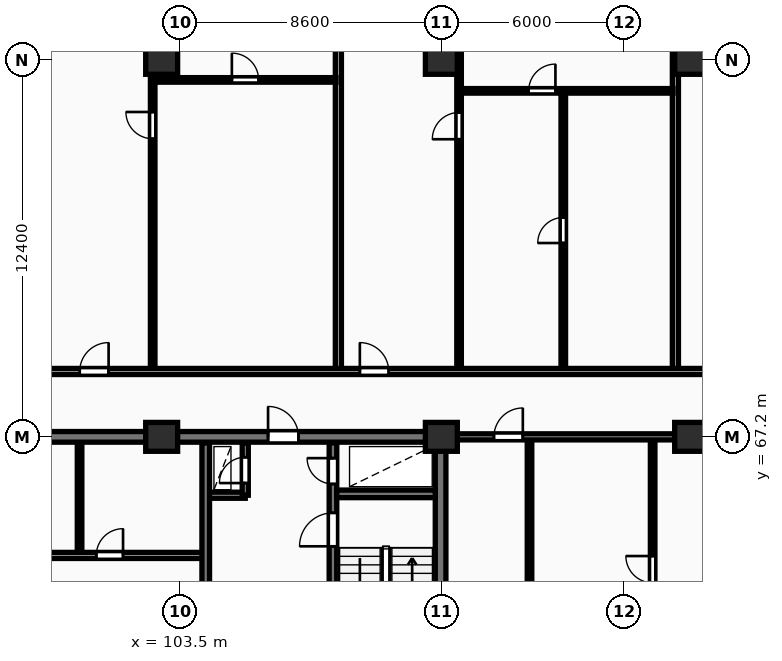
"""IFC4 building model, lengths in metres.
Left out: names, types, materials, properties, quantities, classifications, styles, units other than length and angle.
Written with IfcOpenShell. Run it as: python <this file> out.ifc"""

import sys

from ifc_helpers import new_model, si_unit, direction, frame, frame_2d, origin, origin_2d, place, context, subcontext, project, spatial, rectangle, extrude, element, fill, save


model = new_model("IFC4")
c1 = context("Model", 3, precision=1e-05, world=origin(), true_north=direction((0.0, 1.0)))
c2 = subcontext(c1, "Body", "Model", "MODEL_VIEW")
j1 = project(units=[si_unit("LENGTHUNIT", "METRE"), si_unit("PLANEANGLEUNIT", "RADIAN")], contexts=[c1])
p1 = place(None, origin())
s1 = spatial("IfcSite", under=j1, at=p1, CompositionType="ELEMENT")
p2 = place(p1, origin())
s2 = spatial("IfcBuilding", under=s1, at=p2, CompositionType="ELEMENT")
p3 = place(p2, frame((0.0, 0.0, 24.0)))
s3 = spatial("IfcBuildingStorey", under=s2, at=p3, CompositionType="ELEMENT", Elevation=24.0)
for number, where, z_axis, x_axis in (
    (1, (102.9, 67.2, 0.0), (0.0, 0.0, 1.0), (1.0, 0.0, 0.0)),
    (2, (102.9, 79.6, 0.0), (0.0, 0.0, 1.0), (1.0, 0.0, 0.0)),
    (3, (112.1, 67.2, 0.0), (0.0, 0.0, 1.0), (1.0, 0.0, 0.0)),
    (4, (112.1, 79.6, 0.0), (0.0, 0.0, 1.0), (1.0, 0.0, 0.0)),
    (5, (120.3, 67.2, 0.0), (0.0, 0.0, 1.0), (1.0, 0.0, 0.0)),
    (6, (120.3, 79.6, 0.0), (0.0, 0.0, 1.0), (1.0, 0.0, 0.0)),
):
    element("IfcColumn", number, at=place(p3, frame(where, z_axis=z_axis, x_axis=x_axis)), inside=s3, PredefinedType="COLUMN", context=c2, shape_type="SweptSolid", body=[
        extrude(rectangle(XDim=1.05, YDim=0.95, at=origin_2d()), origin(), (0.0, 0.0, 1.0), 3.25),
    ])
p4 = place(p3, frame((112.075, 55.375, 0.0), z_axis=(0.0, 0.0, 1.0), x_axis=(0.0, 1.0, 0.0)))
e7 = element("IfcWall", 7, at=p4, inside=s3, PredefinedType="SHEAR", context=c2, shape_type="SweptSolid", body=[
    extrude(rectangle(XDim=11.65, YDim=0.35, at=frame_2d((5.825, 0.0))), origin(), (0.0, 0.0, 1.0), 3.25),
])
p5 = place(p3, frame((75.95, 67.2, 0.0), z_axis=(0.0, 0.0, 1.0), x_axis=(1.0, 0.0, 0.0)))
e8 = element("IfcWall", 8, at=p5, inside=s3, PredefinedType="SHEAR", context=c2, shape_type="SweptSolid", body=[
    extrude(rectangle(XDim=36.3, YDim=0.35, at=frame_2d((18.15, 0.0))), origin(), (0.0, 0.0, 1.0), 3.25),
])
p6 = place(p5, frame((5.25, 0.0, 0.0)))
e9 = element("IfcOpeningElement", 9, at=p6, cuts=e8, PredefinedType="OPENING", context=c2, shape_type="SweptSolid", body=[
    extrude(rectangle(XDim=1.0, YDim=2.15, at=frame_2d((0.5, 1.075))), frame((0.0, 0.185, 0.0), z_axis=(0.0, -1.0, 0.0), x_axis=(1.0, 0.0, 0.0)), (0.0, 0.0, 1.0), 0.37),
])
p7 = place(p5, frame((21.6, 0.0, 0.0)))
e10 = element("IfcOpeningElement", 10, at=p7, cuts=e8, PredefinedType="OPENING", context=c2, shape_type="SweptSolid", body=[
    extrude(rectangle(XDim=1.5, YDim=2.2, at=frame_2d((0.75, 1.1))), frame((0.0, 0.185, 0.0), z_axis=(0.0, -1.0, 0.0), x_axis=(1.0, 0.0, 0.0)), (0.0, 0.0, 1.0), 0.37),
])
p8 = place(p5, frame((30.45, 0.0, 0.0)))
e11 = element("IfcOpeningElement", 11, at=p8, cuts=e8, PredefinedType="OPENING", context=c2, shape_type="SweptSolid", body=[
    extrude(rectangle(XDim=1.0, YDim=2.15, at=frame_2d((0.5, 1.075))), frame((0.0, 0.185, 0.0), z_axis=(0.0, -1.0, 0.0), x_axis=(1.0, 0.0, 0.0)), (0.0, 0.0, 1.0), 0.37),
])
p9 = place(p3, frame((100.2, 63.4, 0.0), z_axis=(0.0, 0.0, 1.0), x_axis=(0.0, 1.0, 0.0)))
e12 = element("IfcWall", 12, at=p9, inside=s3, PredefinedType="PARTITIONING", context=c2, shape_type="SweptSolid", body=[
    extrude(rectangle(XDim=3.6, YDim=0.15, at=frame_2d((1.8, 0.0))), origin(), (0.0, 0.0, 1.0), 2.97),
])
p10 = place(p3, frame((84.42, 63.3, 0.0), z_axis=(0.0, 0.0, 1.0), x_axis=(1.0, 0.0, 0.0)))
e13 = element("IfcWall", 13, at=p10, inside=s3, PredefinedType="PARTITIONING", context=c2, shape_type="SweptSolid", body=[
    extrude(rectangle(XDim=19.83, YDim=0.2, at=frame_2d((9.915, 0.0))), origin(), (0.0, 0.0, 1.0), 2.97),
])
p11 = place(p10, frame((1.15, 0.0, 0.0)))
e14 = element("IfcOpeningElement", 14, at=p11, cuts=e13, PredefinedType="OPENING", context=c2, shape_type="SweptSolid", body=[
    extrude(rectangle(XDim=0.85, YDim=2.05, at=frame_2d((0.425, 1.025))), frame((0.0, 0.11, 0.0), z_axis=(0.0, -1.0, 0.0), x_axis=(1.0, 0.0, 0.0)), (0.0, 0.0, 1.0), 0.22),
])
p12 = place(p10, frame((3.25, 0.0, 0.0)))
e15 = element("IfcOpeningElement", 15, at=p12, cuts=e13, PredefinedType="OPENING", context=c2, shape_type="SweptSolid", body=[
    extrude(rectangle(XDim=0.85, YDim=2.05, at=frame_2d((0.425, 1.025))), frame((0.0, 0.11, 0.0), z_axis=(0.0, -1.0, 0.0), x_axis=(1.0, 0.0, 0.0)), (0.0, 0.0, 1.0), 0.22),
])
p13 = place(p10, frame((13.08, 0.0, 0.0)))
e16 = element("IfcOpeningElement", 16, at=p13, cuts=e13, PredefinedType="OPENING", context=c2, shape_type="SweptSolid", body=[
    extrude(rectangle(XDim=1.5, YDim=2.2, at=frame_2d((0.75, 1.1))), frame((0.0, 0.11, 0.0), z_axis=(0.0, -1.0, 0.0), x_axis=(1.0, 0.0, 0.0)), (0.0, 0.0, 1.0), 0.22),
])
p14 = place(p10, frame((6.68, 0.0, 0.0)))
e17 = element("IfcOpeningElement", 17, at=p14, cuts=e13, PredefinedType="OPENING", context=c2, shape_type="SweptSolid", body=[
    extrude(rectangle(XDim=0.92, YDim=2.08, at=frame_2d((0.46, 1.04))), frame((0.0, 0.11, 0.0), z_axis=(0.0, -1.0, 0.0), x_axis=(1.0, 0.0, 0.0)), (0.0, 0.0, 1.0), 0.22),
])
p15 = place(p10, frame((16.33, 0.0, 0.0)))
e18 = element("IfcOpeningElement", 18, at=p15, cuts=e13, PredefinedType="OPENING", context=c2, shape_type="SweptSolid", body=[
    extrude(rectangle(XDim=0.88, YDim=2.06, at=frame_2d((0.44, 1.03))), frame((0.0, 0.11, 0.0), z_axis=(0.0, -1.0, 0.0), x_axis=(1.0, 0.0, 0.0)), (0.0, 0.0, 1.0), 0.22),
])
p16 = place(p3, frame((104.45, 65.28, 0.0), z_axis=(0.0, 0.0, 1.0), x_axis=(1.0, 0.0, 0.0)))
e19 = element("IfcWall", 19, at=p16, inside=s3, PredefinedType="PARTITIONING", context=c2, shape_type="SweptSolid", body=[
    extrude(rectangle(XDim=1.2, YDim=0.2, at=frame_2d((0.6, 0.0))), origin(), (0.0, 0.0, 1.0), 2.97),
])
p17 = place(p3, frame((105.65, 65.28, 0.0), z_axis=(0.0, 0.0, 1.0), x_axis=(0.0, 1.0, 0.0)))
e20 = element("IfcWall", 20, at=p17, inside=s3, PredefinedType="PARTITIONING", context=c2, shape_type="SweptSolid", body=[
    extrude(rectangle(XDim=1.72, YDim=0.2, at=frame_2d((0.86, 0.0))), origin(), (0.0, 0.0, 1.0), 2.97),
])
p18 = place(p17, frame((0.4, 0.0, 0.0)))
e21 = element("IfcOpeningElement", 21, at=p18, cuts=e20, PredefinedType="OPENING", context=c2, shape_type="SweptSolid", body=[
    extrude(rectangle(XDim=0.85, YDim=2.05, at=frame_2d((0.425, 1.025))), frame((0.0, 0.11, 0.0), z_axis=(0.0, -1.0, 0.0), x_axis=(1.0, 0.0, 0.0)), (0.0, 0.0, 1.0), 0.22),
])
p19 = place(p3, frame((104.35, 58.4, 0.0), z_axis=(0.0, 0.0, 1.0), x_axis=(0.0, 1.0, 0.0)))
e22 = element("IfcWall", 22, at=p19, inside=s3, PredefinedType="SHEAR", context=c2, shape_type="SweptSolid", body=[
    extrude(rectangle(XDim=8.6, YDim=0.25, at=frame_2d((4.3, 0.0))), origin(), (0.0, 0.0, 1.0), 3.25),
])
p20 = place(p19, frame((1.8, 0.0, 0.0)))
e23 = element("IfcOpeningElement", 23, at=p20, cuts=e22, PredefinedType="OPENING", context=c2, shape_type="SweptSolid", body=[
    extrude(rectangle(XDim=1.1, YDim=2.1, at=frame_2d((0.55, 1.05))), frame((0.0, 0.135, 0.0), z_axis=(0.0, -1.0, 0.0), x_axis=(1.0, 0.0, 0.0)), (0.0, 0.0, 1.0), 0.27),
])
p21 = place(p3, frame((108.535, 55.4, 0.0), z_axis=(0.0, 0.0, 1.0), x_axis=(0.0, 1.0, 0.0)))
e24 = element("IfcWall", 24, at=p21, inside=s3, PredefinedType="SHEAR", context=c2, shape_type="SweptSolid", body=[
    extrude(rectangle(XDim=11.6, YDim=0.25, at=frame_2d((5.8, 0.0))), origin(), (0.0, 0.0, 1.0), 3.25),
])
p22 = place(p21, frame((8.2, 0.0, 0.0)))
e25 = element("IfcOpeningElement", 25, at=p22, cuts=e24, PredefinedType="OPENING", context=c2, shape_type="SweptSolid", body=[
    extrude(rectangle(XDim=1.1, YDim=2.1, at=frame_2d((0.55, 1.05))), frame((0.0, 0.135, 0.0), z_axis=(0.0, -1.0, 0.0), x_axis=(1.0, 0.0, 0.0)), (0.0, 0.0, 1.0), 0.27),
])
p23 = place(p21, frame((10.25, 0.0, 0.0)))
e26 = element("IfcOpeningElement", 26, at=p23, cuts=e24, PredefinedType="OPENING", context=c2, shape_type="SweptSolid", body=[
    extrude(rectangle(XDim=0.85, YDim=2.05, at=frame_2d((0.425, 1.025))), frame((0.0, 0.135, 0.0), z_axis=(0.0, -1.0, 0.0), x_axis=(1.0, 0.0, 0.0)), (0.0, 0.0, 1.0), 0.27),
])
p24 = place(p3, frame((108.66, 65.325, 0.0), z_axis=(0.0, 0.0, 1.0), x_axis=(1.0, 0.0, 0.0)))
e27 = element("IfcWall", 27, at=p24, inside=s3, PredefinedType="SHEAR", context=c2, shape_type="SweptSolid", body=[
    extrude(rectangle(XDim=3.24, YDim=0.25, at=frame_2d((1.62, 0.0))), origin(), (0.0, 0.0, 1.0), 3.25),
])
p25 = place(p3, frame((119.05, 51.1, 0.0), z_axis=(0.0, 0.0, 1.0), x_axis=(0.0, 1.0, 0.0)))
e28 = element("IfcWall", 28, at=p25, inside=s3, PredefinedType="PARTITIONING", context=c2, shape_type="SweptSolid", body=[
    extrude(rectangle(XDim=16.05, YDim=0.15, at=frame_2d((8.025, 0.0))), origin(), (0.0, 0.0, 1.0), 2.97),
])
p26 = place(p25, frame((11.3, 0.0, 0.0)))
e29 = element("IfcOpeningElement", 29, at=p26, cuts=e28, PredefinedType="OPENING", context=c2, shape_type="SweptSolid", body=[
    extrude(rectangle(XDim=0.88, YDim=2.06, at=frame_2d((0.44, 1.03))), frame((0.0, 0.085, 0.0), z_axis=(0.0, -1.0, 0.0), x_axis=(1.0, 0.0, 0.0)), (0.0, 0.0, 1.0), 0.17),
])
p27 = place(p3, frame((115.0, 55.65, 0.0), z_axis=(0.0, 0.0, 1.0), x_axis=(0.0, 1.0, 0.0)))
e30 = element("IfcWall", 30, at=p27, inside=s3, PredefinedType="PARTITIONING", context=c2, shape_type="SweptSolid", body=[
    extrude(rectangle(XDim=11.5, YDim=0.15, at=frame_2d((5.75, 0.0))), origin(), (0.0, 0.0, 1.0), 2.97),
])
p28 = place(p27, frame((5.29, 0.0, 0.0)))
e31 = element("IfcOpeningElement", 31, at=p28, cuts=e30, PredefinedType="OPENING", context=c2, shape_type="SweptSolid", body=[
    extrude(rectangle(XDim=0.92, YDim=2.08, at=frame_2d((0.46, 1.04))), frame((0.0, 0.085, 0.0), z_axis=(0.0, -1.0, 0.0), x_axis=(1.0, 0.0, 0.0)), (0.0, 0.0, 1.0), 0.17),
])
p29 = place(p3, frame((112.25, 67.2, 0.0), z_axis=(0.0, 0.0, 1.0), x_axis=(1.0, 0.0, 0.0)))
e32 = element("IfcWall", 32, at=p29, inside=s3, PredefinedType="PARTITIONING", context=c2, shape_type="SweptSolid", body=[
    extrude(rectangle(XDim=20.65, YDim=0.2, at=frame_2d((10.325, 0.0))), origin(), (0.0, 0.0, 1.0), 2.37),
])
p30 = place(p29, frame((1.58, 0.0, 0.0)))
e33 = element("IfcOpeningElement", 33, at=p30, cuts=e32, PredefinedType="OPENING", context=c2, shape_type="SweptSolid", body=[
    extrude(rectangle(XDim=0.95, YDim=2.15, at=frame_2d((0.475, 1.075))), frame((0.0, 0.11, 0.0), z_axis=(0.0, -1.0, 0.0), x_axis=(1.0, 0.0, 0.0)), (0.0, 0.0, 1.0), 0.22),
])
p31 = place(p3, frame((108.713, 69.43, 0.0), z_axis=(0.0, 0.0, 1.0), x_axis=(0.0, 1.0, 0.0)))
e34 = element("IfcWall", 34, at=p31, inside=s3, PredefinedType="PARTITIONING", context=c2, shape_type="SweptSolid", body=[
    extrude(rectangle(XDim=29.07, YDim=0.2, at=frame_2d((14.535, 0.0))), origin(), (0.0, 0.0, 1.0), 2.97),
])
p32 = place(p3, frame((102.665, 78.94, 0.0), z_axis=(0.0, 0.0, 1.0), x_axis=(1.0, 0.0, 0.0)))
e35 = element("IfcWall", 35, at=p32, inside=s3, PredefinedType="PARTITIONING", context=c2, shape_type="SweptSolid", body=[
    extrude(rectangle(XDim=5.968, YDim=0.15, at=frame_2d((2.984, 0.0))), origin(), (0.0, 0.0, 1.0), 2.97),
])
p33 = place(p32, frame((2.544, 0.0, 0.0)))
e36 = element("IfcOpeningElement", 36, at=p33, cuts=e35, PredefinedType="OPENING", context=c2, shape_type="SweptSolid", body=[
    extrude(rectangle(XDim=0.88, YDim=2.06, at=frame_2d((0.44, 1.03))), frame((0.0, 0.085, 0.0), z_axis=(0.0, -1.0, 0.0), x_axis=(1.0, 0.0, 0.0)), (0.0, 0.0, 1.0), 0.17),
])
p34 = place(p3, frame((102.605, 69.41, 0.0), z_axis=(0.0, 0.0, 1.0), x_axis=(0.0, 1.0, 0.0)))
e37 = element("IfcWall", 37, at=p34, inside=s3, PredefinedType="PARTITIONING", context=c2, shape_type="SweptSolid", body=[
    extrude(rectangle(XDim=18.7, YDim=0.15, at=frame_2d((9.35, 0.0))), origin(), (0.0, 0.0, 1.0), 2.22),
])
p35 = place(p34, frame((7.595, 0.0, 0.0)))
e38 = element("IfcOpeningElement", 38, at=p35, cuts=e37, PredefinedType="OPENING", context=c2, shape_type="SweptSolid", body=[
    extrude(rectangle(XDim=0.88, YDim=2.06, at=frame_2d((0.44, 1.03))), frame((0.0, 0.085, 0.0), z_axis=(0.0, -1.0, 0.0), x_axis=(1.0, 0.0, 0.0)), (0.0, 0.0, 1.0), 0.17),
])
p36 = place(p3, frame((119.799, 69.43, 0.0), z_axis=(0.0, 0.0, 1.0), x_axis=(0.0, 1.0, 0.0)))
e39 = element("IfcWall", 39, at=p36, inside=s3, PredefinedType="PARTITIONING", context=c2, shape_type="SweptSolid", body=[
    extrude(rectangle(XDim=29.07, YDim=0.2, at=frame_2d((14.535, 0.0))), origin(), (0.0, 0.0, 1.0), 2.97),
])
p37 = place(p3, frame((116.111, 69.41, 0.0), z_axis=(0.0, 0.0, 1.0), x_axis=(0.0, 1.0, 0.0)))
e40 = element("IfcWall", 40, at=p37, inside=s3, PredefinedType="PARTITIONING", context=c2, shape_type="SweptSolid", body=[
    extrude(rectangle(XDim=9.17, YDim=0.15, at=frame_2d((4.585, 0.0))), origin(), (0.0, 0.0, 1.0), 2.97),
])
p38 = place(p37, frame((4.165, 0.0, 0.0)))
e41 = element("IfcOpeningElement", 41, at=p38, cuts=e40, PredefinedType="OPENING", context=c2, shape_type="SweptSolid", body=[
    extrude(rectangle(XDim=0.84, YDim=2.04, at=frame_2d((0.42, 1.02))), frame((0.0, 0.085, 0.0), z_axis=(0.0, -1.0, 0.0), x_axis=(1.0, 0.0, 0.0)), (0.0, 0.0, 1.0), 0.17),
])
p39 = place(p3, frame((112.743, 78.58, 0.0), z_axis=(0.0, 0.0, 1.0), x_axis=(1.0, 0.0, 0.0)))
e42 = element("IfcWall", 42, at=p39, inside=s3, PredefinedType="PARTITIONING", context=c2, shape_type="SweptSolid", body=[
    extrude(rectangle(XDim=6.976, YDim=0.15, at=frame_2d((3.488, 0.0))), origin(), (0.0, 0.0, 1.0), 2.97),
])
p40 = place(p39, frame((2.229, 0.0, 0.0)))
e43 = element("IfcOpeningElement", 43, at=p40, cuts=e42, PredefinedType="OPENING", context=c2, shape_type="SweptSolid", body=[
    extrude(rectangle(XDim=0.88, YDim=2.06, at=frame_2d((0.44, 1.03))), frame((0.0, 0.085, 0.0), z_axis=(0.0, -1.0, 0.0), x_axis=(1.0, 0.0, 0.0)), (0.0, 0.0, 1.0), 0.17),
])
p41 = place(p3, frame((112.683, 69.41, 0.0), z_axis=(0.0, 0.0, 1.0), x_axis=(0.0, 1.0, 0.0)))
e44 = element("IfcWall", 44, at=p41, inside=s3, PredefinedType="PARTITIONING", context=c2, shape_type="SweptSolid", body=[
    extrude(rectangle(XDim=18.7, YDim=0.15, at=frame_2d((9.35, 0.0))), origin(), (0.0, 0.0, 1.0), 2.97),
])
p42 = place(p41, frame((7.579, 0.0, 0.0)))
e45 = element("IfcOpeningElement", 45, at=p42, cuts=e44, PredefinedType="OPENING", context=c2, shape_type="SweptSolid", body=[
    extrude(rectangle(XDim=0.88, YDim=2.06, at=frame_2d((0.44, 1.03))), frame((0.0, 0.085, 0.0), z_axis=(0.0, -1.0, 0.0), x_axis=(1.0, 0.0, 0.0)), (0.0, 0.0, 1.0), 0.17),
])
p43 = place(p3, frame((55.3, 69.35, 0.0), z_axis=(0.0, 0.0, 1.0), x_axis=(1.0, 0.0, 0.0)))
e46 = element("IfcWall", 46, at=p43, inside=s3, PredefinedType="PARTITIONING", context=c2, shape_type="SweptSolid", body=[
    extrude(rectangle(XDim=77.6, YDim=0.2, at=frame_2d((38.8, 0.0))), origin(), (0.0, 0.0, 1.0), 2.97),
])
p44 = place(p43, frame((1.81, 0.0, 0.0)))
e47 = element("IfcOpeningElement", 47, at=p44, cuts=e46, PredefinedType="OPENING", context=c2, shape_type="SweptSolid", body=[
    extrude(rectangle(XDim=0.95, YDim=2.15, at=frame_2d((0.475, 1.075))), frame((0.0, 0.11, 0.0), z_axis=(0.0, -1.0, 0.0), x_axis=(1.0, 0.0, 0.0)), (0.0, 0.0, 1.0), 0.22),
])
p45 = place(p43, frame((10.448, 0.0, 0.0)))
e48 = element("IfcOpeningElement", 48, at=p45, cuts=e46, PredefinedType="OPENING", context=c2, shape_type="SweptSolid", body=[
    extrude(rectangle(XDim=0.95, YDim=2.15, at=frame_2d((0.475, 1.075))), frame((0.0, 0.11, 0.0), z_axis=(0.0, -1.0, 0.0), x_axis=(1.0, 0.0, 0.0)), (0.0, 0.0, 1.0), 0.22),
])
p46 = place(p43, frame((23.208, 0.0, 0.0)))
e49 = element("IfcOpeningElement", 49, at=p46, cuts=e46, PredefinedType="OPENING", context=c2, shape_type="SweptSolid", body=[
    extrude(rectangle(XDim=0.95, YDim=2.15, at=frame_2d((0.475, 1.075))), frame((0.0, 0.11, 0.0), z_axis=(0.0, -1.0, 0.0), x_axis=(1.0, 0.0, 0.0)), (0.0, 0.0, 1.0), 0.22),
])
p47 = place(p43, frame((33.287, 0.0, 0.0)))
e50 = element("IfcOpeningElement", 50, at=p47, cuts=e46, PredefinedType="OPENING", context=c2, shape_type="SweptSolid", body=[
    extrude(rectangle(XDim=0.95, YDim=2.15, at=frame_2d((0.475, 1.075))), frame((0.0, 0.11, 0.0), z_axis=(0.0, -1.0, 0.0), x_axis=(1.0, 0.0, 0.0)), (0.0, 0.0, 1.0), 0.22),
])
p48 = place(p43, frame((44.905, 0.0, 0.0)))
e51 = element("IfcOpeningElement", 51, at=p48, cuts=e46, PredefinedType="OPENING", context=c2, shape_type="SweptSolid", body=[
    extrude(rectangle(XDim=0.95, YDim=2.15, at=frame_2d((0.475, 1.075))), frame((0.0, 0.11, 0.0), z_axis=(0.0, -1.0, 0.0), x_axis=(1.0, 0.0, 0.0)), (0.0, 0.0, 1.0), 0.22),
])
p49 = place(p43, frame((54.119, 0.0, 0.0)))
e52 = element("IfcOpeningElement", 52, at=p49, cuts=e46, PredefinedType="OPENING", context=c2, shape_type="SweptSolid", body=[
    extrude(rectangle(XDim=0.95, YDim=2.15, at=frame_2d((0.475, 1.075))), frame((0.0, 0.11, 0.0), z_axis=(0.0, -1.0, 0.0), x_axis=(1.0, 0.0, 0.0)), (0.0, 0.0, 1.0), 0.22),
])
p50 = place(p43, frame((66.74, 0.0, 0.0)))
e53 = element("IfcOpeningElement", 53, at=p50, cuts=e46, PredefinedType="OPENING", context=c2, shape_type="SweptSolid", body=[
    extrude(rectangle(XDim=0.95, YDim=2.15, at=frame_2d((0.475, 1.075))), frame((0.0, 0.11, 0.0), z_axis=(0.0, -1.0, 0.0), x_axis=(1.0, 0.0, 0.0)), (0.0, 0.0, 1.0), 0.22),
])
p51 = place(p8, origin())
e54 = element("IfcDoor", 54, at=p51, inside=s3, OperationType="SINGLE_SWING_LEFT", PredefinedType="DOOR", context=c2, shape_type="SweptSolid", body=[
    extrude(rectangle(XDim=1.0, YDim=2.15, at=frame_2d((0.5, 1.075))), frame((0.0, 0.025, 0.0), z_axis=(0.0, -1.0, 0.0), x_axis=(1.0, 0.0, 0.0)), (0.0, 0.0, 1.0), 0.05),
])
fill(e11, e54)
p52 = place(p15, origin())
e55 = element("IfcDoor", 55, at=p52, inside=s3, OperationType="SINGLE_SWING_RIGHT", PredefinedType="DOOR", context=c2, shape_type="SweptSolid", body=[
    extrude(rectangle(XDim=0.88, YDim=2.06, at=frame_2d((0.44, 1.03))), frame((0.0, 0.025, 0.0), z_axis=(0.0, -1.0, 0.0), x_axis=(1.0, 0.0, 0.0)), (0.0, 0.0, 1.0), 0.05),
])
fill(e18, e55)
p53 = place(p18, origin())
e56 = element("IfcDoor", 56, at=p53, inside=s3, OperationType="SINGLE_SWING_LEFT", PredefinedType="DOOR", context=c2, shape_type="SweptSolid", body=[
    extrude(rectangle(XDim=0.85, YDim=2.05, at=frame_2d((0.425, 1.025))), frame((0.0, 0.025, 0.0), z_axis=(0.0, -1.0, 0.0), x_axis=(1.0, 0.0, 0.0)), (0.0, 0.0, 1.0), 0.05),
])
fill(e21, e56)
p54 = place(p22, origin())
e57 = element("IfcDoor", 57, at=p54, inside=s3, OperationType="SINGLE_SWING_LEFT", PredefinedType="DOOR", context=c2, shape_type="SweptSolid", body=[
    extrude(rectangle(XDim=1.1, YDim=2.1, at=frame_2d((0.55, 1.05))), frame((0.0, 0.025, 0.0), z_axis=(0.0, -1.0, 0.0), x_axis=(1.0, 0.0, 0.0)), (0.0, 0.0, 1.0), 0.05),
])
fill(e25, e57)
p55 = place(p23, origin())
e58 = element("IfcDoor", 58, at=p55, inside=s3, OperationType="SINGLE_SWING_RIGHT", PredefinedType="DOOR", context=c2, shape_type="SweptSolid", body=[
    extrude(rectangle(XDim=0.85, YDim=2.05, at=frame_2d((0.425, 1.025))), frame((0.0, 0.025, 0.0), z_axis=(0.0, -1.0, 0.0), x_axis=(1.0, 0.0, 0.0)), (0.0, 0.0, 1.0), 0.05),
])
fill(e26, e58)
p56 = place(p26, origin())
e59 = element("IfcDoor", 59, at=p56, inside=s3, OperationType="SINGLE_SWING_RIGHT", PredefinedType="DOOR", context=c2, shape_type="SweptSolid", body=[
    extrude(rectangle(XDim=0.88, YDim=2.06, at=frame_2d((0.44, 1.03))), frame((0.0, 0.025, 0.0), z_axis=(0.0, -1.0, 0.0), x_axis=(1.0, 0.0, 0.0)), (0.0, 0.0, 1.0), 0.05),
])
fill(e29, e59)
p57 = place(p30, origin())
e60 = element("IfcDoor", 60, at=p57, inside=s3, OperationType="SINGLE_SWING_RIGHT", PredefinedType="DOOR", context=c2, shape_type="SweptSolid", body=[
    extrude(rectangle(XDim=0.95, YDim=2.15, at=frame_2d((0.475, 1.075))), frame((0.0, 0.025, 0.0), z_axis=(0.0, -1.0, 0.0), x_axis=(1.0, 0.0, 0.0)), (0.0, 0.0, 1.0), 0.05),
])
fill(e33, e60)
p58 = place(p33, origin())
e61 = element("IfcDoor", 61, at=p58, inside=s3, OperationType="SINGLE_SWING_LEFT", PredefinedType="DOOR", context=c2, shape_type="SweptSolid", body=[
    extrude(rectangle(XDim=0.88, YDim=2.06, at=frame_2d((0.44, 1.03))), frame((0.0, 0.025, 0.0), z_axis=(0.0, -1.0, 0.0), x_axis=(1.0, 0.0, 0.0)), (0.0, 0.0, 1.0), 0.05),
])
fill(e36, e61)
p59 = place(p35, origin())
e62 = element("IfcDoor", 62, at=p59, inside=s3, OperationType="SINGLE_SWING_RIGHT", PredefinedType="DOOR", context=c2, shape_type="SweptSolid", body=[
    extrude(rectangle(XDim=0.88, YDim=2.06, at=frame_2d((0.44, 1.03))), frame((0.0, 0.025, 0.0), z_axis=(0.0, -1.0, 0.0), x_axis=(1.0, 0.0, 0.0)), (0.0, 0.0, 1.0), 0.05),
])
fill(e38, e62)
p60 = place(p38, origin())
e63 = element("IfcDoor", 63, at=p60, inside=s3, OperationType="SINGLE_SWING_LEFT", PredefinedType="DOOR", context=c2, shape_type="SweptSolid", body=[
    extrude(rectangle(XDim=0.84, YDim=2.04, at=frame_2d((0.42, 1.02))), frame((0.0, 0.025, 0.0), z_axis=(0.0, -1.0, 0.0), x_axis=(1.0, 0.0, 0.0)), (0.0, 0.0, 1.0), 0.05),
])
fill(e41, e63)
p61 = place(p40, origin())
e64 = element("IfcDoor", 64, at=p61, inside=s3, OperationType="SINGLE_SWING_RIGHT", PredefinedType="DOOR", context=c2, shape_type="SweptSolid", body=[
    extrude(rectangle(XDim=0.88, YDim=2.06, at=frame_2d((0.44, 1.03))), frame((0.0, 0.025, 0.0), z_axis=(0.0, -1.0, 0.0), x_axis=(1.0, 0.0, 0.0)), (0.0, 0.0, 1.0), 0.05),
])
fill(e43, e64)
p62 = place(p42, origin())
e65 = element("IfcDoor", 65, at=p62, inside=s3, OperationType="SINGLE_SWING_LEFT", PredefinedType="DOOR", context=c2, shape_type="SweptSolid", body=[
    extrude(rectangle(XDim=0.88, YDim=2.06, at=frame_2d((0.44, 1.03))), frame((0.0, 0.025, 0.0), z_axis=(0.0, -1.0, 0.0), x_axis=(1.0, 0.0, 0.0)), (0.0, 0.0, 1.0), 0.05),
])
fill(e45, e65)
p63 = place(p48, origin())
e66 = element("IfcDoor", 66, at=p63, inside=s3, OperationType="SINGLE_SWING_RIGHT", PredefinedType="DOOR", context=c2, shape_type="SweptSolid", body=[
    extrude(rectangle(XDim=0.95, YDim=2.15, at=frame_2d((0.475, 1.075))), frame((0.0, 0.025, 0.0), z_axis=(0.0, -1.0, 0.0), x_axis=(1.0, 0.0, 0.0)), (0.0, 0.0, 1.0), 0.05),
])
fill(e51, e66)
p64 = place(p49, origin())
e67 = element("IfcDoor", 67, at=p64, inside=s3, OperationType="SINGLE_SWING_LEFT", PredefinedType="DOOR", context=c2, shape_type="SweptSolid", body=[
    extrude(rectangle(XDim=0.95, YDim=2.15, at=frame_2d((0.475, 1.075))), frame((0.0, 0.025, 0.0), z_axis=(0.0, -1.0, 0.0), x_axis=(1.0, 0.0, 0.0)), (0.0, 0.0, 1.0), 0.05),
])
fill(e52, e67)
save(model, sys.argv[1])
